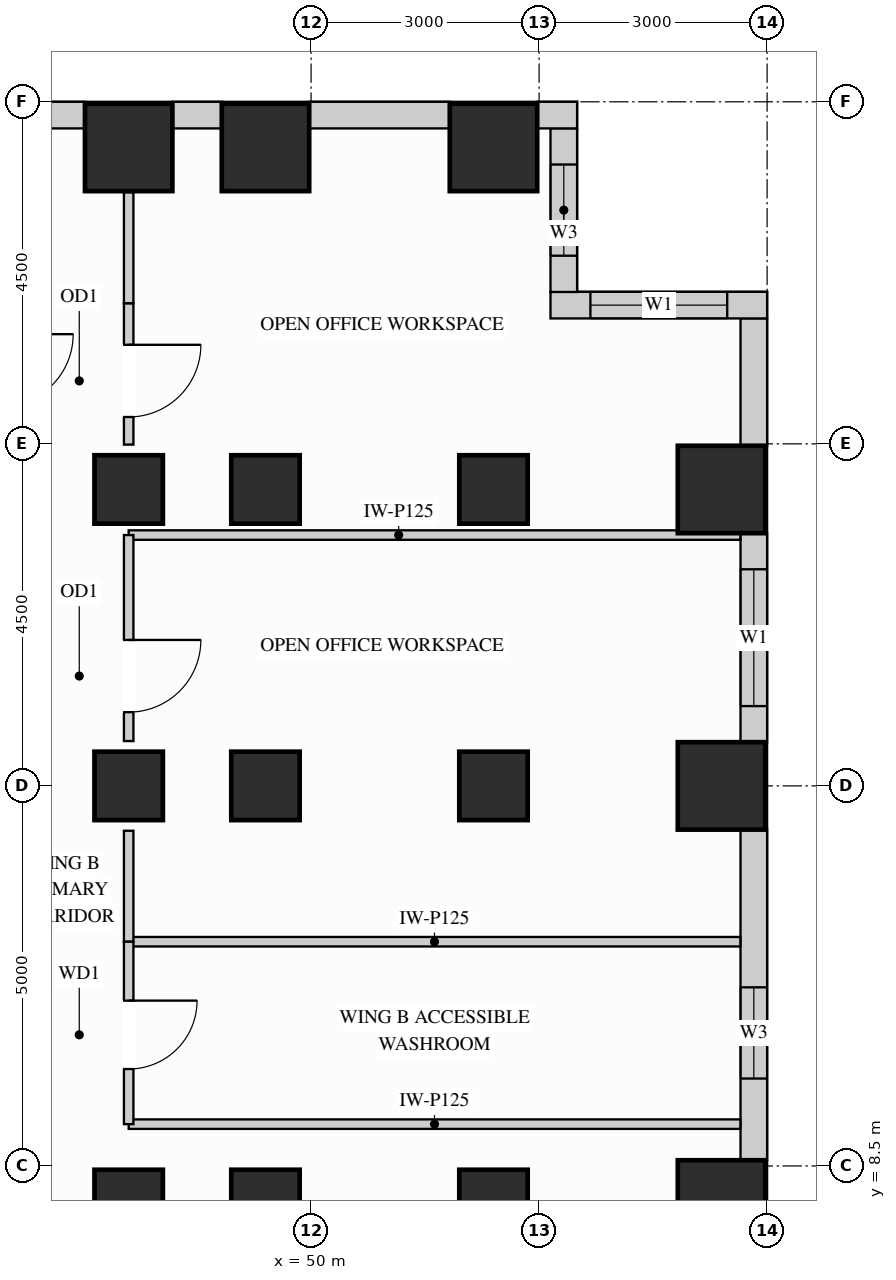
"""IFC4 building model, lengths in metres.
Left out: names, types, materials, properties, quantities, classifications, styles, units other than length and angle.
Written with IfcOpenShell. Run it as: python <this file> out.ifc"""

import sys

from ifc_helpers import new_model, si_unit, direction, frame, frame_2d, origin, origin_2d, place, context, subcontext, project, spatial, rectangle, extrude, source, transform, mapped, element, fill, save


model = new_model("IFC4")
c1 = context("Model", 3, precision=1e-05, world=origin(), true_north=direction((0.0, 1.0)))
c2 = subcontext(c1, "Body", "Model", "MODEL_VIEW")
j1 = project(units=[si_unit("LENGTHUNIT", "METRE"), si_unit("PLANEANGLEUNIT", "RADIAN")], contexts=[c1])
p1 = place(None, origin())
s1 = spatial("IfcSite", under=j1, at=p1, CompositionType="ELEMENT")
p2 = place(p1, origin())
s2 = spatial("IfcBuilding", under=s1, at=p2, CompositionType="ELEMENT")
p3 = place(p2, frame((0.0, 0.0, 106.2)))
s3 = spatial("IfcBuildingStorey", under=s2, at=p3, CompositionType="ELEMENT", Elevation=106.2)
m1 = source(origin(), c2, "Body", "SweptSolid", [
    extrude(rectangle(XDim=0.9, YDim=0.9, at=origin_2d()), origin(), (0.0, 0.0, 1.0), 3.38),
])
for number, where, z_axis, x_axis in (
    (1, (47.6, 13.5, 0.0), (0.0, 0.0, 1.0), (1.0, 0.0, 0.0)),
    (2, (47.6, 8.0, 0.0), (0.0, 0.0, 1.0), (1.0, 0.0, 0.0)),
    (3, (47.6, 17.4, 0.0), (0.0, 0.0, 1.0), (1.0, 0.0, 0.0)),
    (4, (49.4, 13.5, 0.0), (0.0, 0.0, 1.0), (1.0, 0.0, 0.0)),
    (5, (49.4, 17.4, 0.0), (0.0, 0.0, 1.0), (1.0, 0.0, 0.0)),
    (6, (49.4, 8.0, 0.0), (0.0, 0.0, 1.0), (1.0, 0.0, 0.0)),
    (7, (52.4, 13.5, 0.0), (0.0, 0.0, 1.0), (1.0, 0.0, 0.0)),
    (8, (52.4, 17.4, 0.0), (0.0, 0.0, 1.0), (1.0, 0.0, 0.0)),
    (9, (52.4, 8.0, 0.0), (0.0, 0.0, 1.0), (1.0, 0.0, 0.0)),
):
    element("IfcColumn", number, at=place(p3, frame(where, z_axis=z_axis, x_axis=x_axis)), inside=s3, PredefinedType="COLUMN", context=c2, shape_type="MappedRepresentation", body=[
        mapped(m1, transform((0.0, 0.0, 0.0), x_axis=(1.0, 0.0, 0.0), y_axis=(0.0, 1.0, 0.0), z_axis=(0.0, 0.0, 1.0))),
    ])
m2 = source(origin(), c2, "Body", "SweptSolid", [
    extrude(rectangle(XDim=1.15, YDim=1.15, at=origin_2d()), origin(), (0.0, 0.0, 1.0), 3.38),
])
for number, where, z_axis, x_axis in (
    (10, (47.6, 21.9, 0.0), (0.0, 0.0, 1.0), (1.0, 0.0, 0.0)),
    (11, (49.4, 21.9, 0.0), (0.0, 0.0, 1.0), (1.0, 0.0, 0.0)),
    (12, (52.4, 21.9, 0.0), (0.0, 0.0, 1.0), (1.0, 0.0, 0.0)),
    (13, (55.4, 13.5, 0.0), (0.0, 0.0, 1.0), (1.0, 0.0, 0.0)),
    (14, (55.4, 17.4, 0.0), (0.0, 0.0, 1.0), (1.0, 0.0, 0.0)),
    (15, (55.4, 8.0, 0.0), (0.0, 0.0, 1.0), (1.0, 0.0, 0.0)),
):
    element("IfcColumn", number, at=place(p3, frame(where, z_axis=z_axis, x_axis=x_axis)), inside=s3, PredefinedType="COLUMN", context=c2, shape_type="MappedRepresentation", body=[
        mapped(m2, transform((0.0, 0.0, 0.0), x_axis=(1.0, 0.0, 0.0), y_axis=(0.0, 1.0, 0.0), z_axis=(0.0, 0.0, 1.0))),
    ])
p4 = place(p3, frame((55.825, 8.573, 0.0), z_axis=(0.0, 0.0, 1.0), x_axis=(0.0, 1.0, 0.0)))
e16 = element("IfcWall", 16, at=p4, inside=s3, PredefinedType="SOLIDWALL", context=c2, shape_type="SweptSolid", body=[
    extrude(rectangle(XDim=4.354, YDim=0.35, at=frame_2d((2.177, 0.0))), origin(), (0.0, 0.0, 1.0), 3.365),
])
p5 = place(p4, frame((1.077, 0.0, 0.78)))
e17 = element("IfcOpeningElement", 17, at=p5, cuts=e16, PredefinedType="OPENING", context=c2, shape_type="SweptSolid", body=[
    extrude(rectangle(XDim=1.2, YDim=2.1, at=frame_2d((0.6, 1.05))), frame((0.0, 0.185, 0.0), z_axis=(0.0, -1.0, 0.0), x_axis=(1.0, 0.0, 0.0)), (0.0, 0.0, 1.0), 0.37),
])
p6 = place(p3, frame((55.825, 14.073, 0.0), z_axis=(0.0, 0.0, 1.0), x_axis=(0.0, 1.0, 0.0)))
e18 = element("IfcWall", 18, at=p6, inside=s3, PredefinedType="SOLIDWALL", context=c2, shape_type="SweptSolid", body=[
    extrude(rectangle(XDim=2.754, YDim=0.35, at=frame_2d((1.377, 0.0))), origin(), (0.0, 0.0, 1.0), 3.365),
])
p7 = place(p6, frame((0.477, 0.0, 0.78)))
e19 = element("IfcOpeningElement", 19, at=p7, cuts=e18, PredefinedType="OPENING", context=c2, shape_type="SweptSolid", body=[
    extrude(rectangle(XDim=1.8, YDim=2.1, at=frame_2d((0.9, 1.05))), frame((0.0, 0.185, 0.0), z_axis=(0.0, -1.0, 0.0), x_axis=(1.0, 0.0, 0.0)), (0.0, 0.0, 1.0), 0.37),
])
m3 = source(origin(), c2, "Body", "SweptSolid", [
    extrude(rectangle(XDim=1.679, YDim=0.35, at=frame_2d((0.84, 0.0))), origin(), (0.0, 0.0, 1.0), 3.365),
])
p8 = place(p3, frame((55.825, 17.973, 0.0), z_axis=(0.0, 0.0, 1.0), x_axis=(0.0, 1.0, 0.0)))
e20 = element("IfcWall", 20, at=p8, inside=s3, PredefinedType="SOLIDWALL", context=c2, shape_type="MappedRepresentation", body=[
    mapped(m3, transform((0.0, 0.0, 0.0), x_axis=(1.0, 0.0, 0.0), y_axis=(0.0, 1.0, 0.0), z_axis=(0.0, 0.0, 1.0))),
])
p9 = place(p3, frame((56.0, 19.825, 0.0), z_axis=(0.0, 0.0, 1.0), x_axis=(-1.0, 0.0, 0.0)))
e21 = element("IfcWall", 21, at=p9, inside=s3, PredefinedType="SOLIDWALL", context=c2, shape_type="SweptSolid", body=[
    extrude(rectangle(XDim=2.85, YDim=0.35, at=frame_2d((1.425, 0.0))), origin(), (0.0, 0.0, 1.0), 3.365),
])
p10 = place(p9, frame((0.525, 0.0, 0.78)))
e22 = element("IfcOpeningElement", 22, at=p10, cuts=e21, PredefinedType="OPENING", context=c2, shape_type="SweptSolid", body=[
    extrude(rectangle(XDim=1.8, YDim=2.1, at=frame_2d((0.9, 1.05))), frame((0.0, 0.185, 0.0), z_axis=(0.0, -1.0, 0.0), x_axis=(1.0, 0.0, 0.0)), (0.0, 0.0, 1.0), 0.37),
])
p11 = place(p3, frame((53.325, 19.998, 0.0), z_axis=(0.0, 0.0, 1.0), x_axis=(0.0, 1.0, 0.0)))
e23 = element("IfcWall", 23, at=p11, inside=s3, PredefinedType="SOLIDWALL", context=c2, shape_type="SweptSolid", body=[
    extrude(rectangle(XDim=2.154, YDim=0.35, at=frame_2d((1.077, 0.0))), origin(), (0.0, 0.0, 1.0), 3.365),
])
p12 = place(p11, frame((0.477, 0.0, 0.78)))
e24 = element("IfcOpeningElement", 24, at=p12, cuts=e23, PredefinedType="OPENING", context=c2, shape_type="SweptSolid", body=[
    extrude(rectangle(XDim=1.2, YDim=2.1, at=frame_2d((0.6, 1.05))), frame((0.0, 0.185, 0.0), z_axis=(0.0, -1.0, 0.0), x_axis=(1.0, 0.0, 0.0)), (0.0, 0.0, 1.0), 0.37),
])
m4 = source(origin(), c2, "Body", "SweptSolid", [
    extrude(rectangle(XDim=0.527, YDim=0.35, at=frame_2d((0.264, 0.0))), origin(), (0.0, 0.0, 1.0), 3.365),
])
p13 = place(p3, frame((53.5, 22.325, 0.0), z_axis=(0.0, 0.0, 1.0), x_axis=(-1.0, 0.0, 0.0)))
e25 = element("IfcWall", 25, at=p13, inside=s3, PredefinedType="SOLIDWALL", context=c2, shape_type="MappedRepresentation", body=[
    mapped(m4, transform((0.0, 0.0, 0.0), x_axis=(1.0, 0.0, 0.0), y_axis=(0.0, 1.0, 0.0), z_axis=(0.0, 0.0, 1.0))),
])
m5 = source(origin(), c2, "Body", "SweptSolid", [
    extrude(rectangle(XDim=1.854, YDim=0.35, at=frame_2d((0.927, 0.0))), origin(), (0.0, 0.0, 1.0), 3.365),
])
p14 = place(p3, frame((51.827, 22.325, 0.0), z_axis=(0.0, 0.0, 1.0), x_axis=(-1.0, 0.0, 0.0)))
e26 = element("IfcWall", 26, at=p14, inside=s3, PredefinedType="SOLIDWALL", context=c2, shape_type="MappedRepresentation", body=[
    mapped(m5, transform((0.0, 0.0, 0.0), x_axis=(1.0, 0.0, 0.0), y_axis=(0.0, 1.0, 0.0), z_axis=(0.0, 0.0, 1.0))),
])
m6 = source(origin(), c2, "Body", "SweptSolid", [
    extrude(rectangle(XDim=0.654, YDim=0.35, at=frame_2d((0.327, 0.0))), origin(), (0.0, 0.0, 1.0), 3.365),
])
p15 = place(p3, frame((48.827, 22.325, 0.0), z_axis=(0.0, 0.0, 1.0), x_axis=(-1.0, 0.0, 0.0)))
e27 = element("IfcWall", 27, at=p15, inside=s3, PredefinedType="SOLIDWALL", context=c2, shape_type="MappedRepresentation", body=[
    mapped(m6, transform((0.0, 0.0, 0.0), x_axis=(1.0, 0.0, 0.0), y_axis=(0.0, 1.0, 0.0), z_axis=(0.0, 0.0, 1.0))),
])
p16 = place(p3, frame((47.027, 22.325, 0.0), z_axis=(0.0, 0.0, 1.0), x_axis=(-1.0, 0.0, 0.0)))
e28 = element("IfcWall", 28, at=p16, inside=s3, PredefinedType="SOLIDWALL", context=c2, shape_type="SweptSolid", body=[
    extrude(rectangle(XDim=6.454, YDim=0.35, at=frame_2d((3.227, 0.0))), origin(), (0.0, 0.0, 1.0), 3.365),
])
p17 = place(p16, frame((1.749, 0.0, 0.78)))
e29 = element("IfcOpeningElement", 29, at=p17, cuts=e28, PredefinedType="OPENING", context=c2, shape_type="SweptSolid", body=[
    extrude(rectangle(XDim=1.8, YDim=2.1, at=frame_2d((0.9, 1.05))), frame((0.0, 0.185, 0.0), z_axis=(0.0, -1.0, 0.0), x_axis=(1.0, 0.0, 0.0)), (0.0, 0.0, 1.0), 0.37),
])
p18 = place(p16, frame((3.942, 0.0, 0.78)))
e30 = element("IfcOpeningElement", 30, at=p18, cuts=e28, PredefinedType="OPENING", context=c2, shape_type="SweptSolid", body=[
    extrude(rectangle(XDim=1.8, YDim=2.1, at=frame_2d((0.9, 1.05))), frame((0.0, 0.185, 0.0), z_axis=(0.0, -1.0, 0.0), x_axis=(1.0, 0.0, 0.0)), (0.0, 0.0, 1.0), 0.37),
])
m7 = source(origin(), c2, "Body", "SweptSolid", [
    extrude(rectangle(XDim=8.048, YDim=0.125, at=frame_2d((4.024, 0.0))), origin(), (0.0, 0.0, 1.0), 3.365),
])
for number, where, z_axis, x_axis in (
    (31, (47.6, 11.45, 0.0), (0.0, 0.0, 1.0), (1.0, 0.0, 0.0)),
    (32, (47.6, 16.8, 0.0), (0.0, 0.0, 1.0), (1.0, 0.0, 0.0)),
    (33, (47.6, 9.05, 0.0), (0.0, 0.0, 1.0), (1.0, 0.0, 0.0)),
):
    element("IfcWall", number, at=place(p3, frame(where, z_axis=z_axis, x_axis=x_axis)), inside=s3, PredefinedType="PARTITIONING", context=c2, shape_type="MappedRepresentation", body=[
        mapped(m7, transform((0.0, 0.0, 0.0), x_axis=(1.0, 0.0, 0.0), y_axis=(0.0, 1.0, 0.0), z_axis=(0.0, 0.0, 1.0))),
    ])
m8 = source(origin(), c2, "Body", "SweptSolid", [
    extrude(rectangle(XDim=1.46, YDim=0.125, at=frame_2d((0.73, 0.0))), origin(), (0.0, 0.0, 1.0), 2.677),
])
p19 = place(p3, frame((47.6, 11.45, 0.0), z_axis=(0.0, 0.0, 1.0), x_axis=(0.0, 1.0, 0.0)))
e34 = element("IfcWall", 34, at=p19, inside=s3, PredefinedType="PARTITIONING", context=c2, shape_type="MappedRepresentation", body=[
    mapped(m8, transform((0.0, 0.0, 0.0), x_axis=(1.0, 0.0, 0.0), y_axis=(0.0, 1.0, 0.0), z_axis=(0.0, 0.0, 1.0))),
])
p20 = place(p3, frame((47.6, 14.09, 0.0), z_axis=(0.0, 0.0, 1.0), x_axis=(0.0, 1.0, 0.0)))
e35 = element("IfcWall", 35, at=p20, inside=s3, PredefinedType="PARTITIONING", context=c2, shape_type="SweptSolid", body=[
    extrude(rectangle(XDim=2.71, YDim=0.125, at=frame_2d((1.355, 0.0))), origin(), (0.0, 0.0, 1.0), 2.677),
])
p21 = place(p20, frame((0.38, 0.0, 0.0)))
e36 = element("IfcOpeningElement", 36, at=p21, cuts=e35, PredefinedType="OPENING", context=c2, shape_type="SweptSolid", body=[
    extrude(rectangle(XDim=0.95, YDim=2.15, at=frame_2d((0.475, 1.075))), frame((0.0, 0.073, 0.0), z_axis=(0.0, -1.0, 0.0), x_axis=(1.0, 0.0, 0.0)), (0.0, 0.0, 1.0), 0.145),
])
p22 = place(p3, frame((47.6, 17.99, 0.0), z_axis=(0.0, 0.0, 1.0), x_axis=(0.0, 1.0, 0.0)))
e37 = element("IfcWall", 37, at=p22, inside=s3, PredefinedType="PARTITIONING", context=c2, shape_type="SweptSolid", body=[
    extrude(rectangle(XDim=1.86, YDim=0.125, at=frame_2d((0.93, 0.0))), origin(), (0.0, 0.0, 1.0), 2.677),
])
p23 = place(p22, frame((0.363, 0.0, 0.0)))
e38 = element("IfcOpeningElement", 38, at=p23, cuts=e37, PredefinedType="OPENING", context=c2, shape_type="SweptSolid", body=[
    extrude(rectangle(XDim=0.95, YDim=2.15, at=frame_2d((0.475, 1.075))), frame((0.0, 0.073, 0.0), z_axis=(0.0, -1.0, 0.0), x_axis=(1.0, 0.0, 0.0)), (0.0, 0.0, 1.0), 0.145),
])
p24 = place(p3, frame((47.6, 19.85, 0.0), z_axis=(0.0, 0.0, 1.0), x_axis=(0.0, 1.0, 0.0)))
e39 = element("IfcWall", 39, at=p24, inside=s3, PredefinedType="PARTITIONING", context=c2, shape_type="MappedRepresentation", body=[
    mapped(m8, transform((0.0, 0.0, 0.0), x_axis=(1.0, 0.0, 0.0), y_axis=(0.0, 1.0, 0.0), z_axis=(0.0, 0.0, 1.0))),
])
p25 = place(p3, frame((47.6, 9.05, 0.0), z_axis=(0.0, 0.0, 1.0), x_axis=(0.0, 1.0, 0.0)))
e40 = element("IfcWall", 40, at=p25, inside=s3, PredefinedType="PARTITIONING", context=c2, shape_type="SweptSolid", body=[
    extrude(rectangle(XDim=2.4, YDim=0.125, at=frame_2d((1.2, 0.0))), origin(), (0.0, 0.0, 1.0), 2.677),
])
p26 = place(p25, frame((0.725, 0.0, 0.0)))
e41 = element("IfcOpeningElement", 41, at=p26, cuts=e40, PredefinedType="OPENING", context=c2, shape_type="SweptSolid", body=[
    extrude(rectangle(XDim=0.9, YDim=2.15, at=frame_2d((0.45, 1.075))), frame((0.0, 0.073, 0.0), z_axis=(0.0, -1.0, 0.0), x_axis=(1.0, 0.0, 0.0)), (0.0, 0.0, 1.0), 0.145),
])
m9 = source(origin(), c2, "Body", "SweptSolid", [
    extrude(rectangle(XDim=0.95, YDim=2.15, at=frame_2d((0.475, 1.075))), frame((0.0, 0.025, 0.0), z_axis=(0.0, -1.0, 0.0), x_axis=(1.0, 0.0, 0.0)), (0.0, 0.0, 1.0), 0.05),
])
p27 = place(p21, origin())
e42 = element("IfcDoor", 42, at=p27, inside=s3, OperationType="SINGLE_SWING_RIGHT", PredefinedType="DOOR", context=c2, shape_type="MappedRepresentation", body=[
    mapped(m9, transform((0.0, 0.0, 0.0), x_axis=(1.0, 0.0, 0.0), y_axis=(0.0, 1.0, 0.0), z_axis=(0.0, 0.0, 1.0))),
])
fill(e36, e42)
p28 = place(p23, origin())
e43 = element("IfcDoor", 43, at=p28, inside=s3, OperationType="SINGLE_SWING_RIGHT", PredefinedType="DOOR", context=c2, shape_type="MappedRepresentation", body=[
    mapped(m9, transform((0.0, 0.0, 0.0), x_axis=(1.0, 0.0, 0.0), y_axis=(0.0, 1.0, 0.0), z_axis=(0.0, 0.0, 1.0))),
])
fill(e38, e43)
m10 = source(origin(), c2, "Body", "SweptSolid", [
    extrude(rectangle(XDim=0.9, YDim=2.15, at=frame_2d((0.45, 1.075))), frame((0.0, 0.025, 0.0), z_axis=(0.0, -1.0, 0.0), x_axis=(1.0, 0.0, 0.0)), (0.0, 0.0, 1.0), 0.05),
])
p29 = place(p26, origin())
e44 = element("IfcDoor", 44, at=p29, inside=s3, OperationType="SINGLE_SWING_RIGHT", PredefinedType="DOOR", context=c2, shape_type="MappedRepresentation", body=[
    mapped(m10, transform((0.0, 0.0, 0.0), x_axis=(1.0, 0.0, 0.0), y_axis=(0.0, 1.0, 0.0), z_axis=(0.0, 0.0, 1.0))),
])
fill(e41, e44)
m11 = source(origin(), c2, "Body", "SweptSolid", [
    extrude(rectangle(XDim=1.8, YDim=2.1, at=frame_2d((0.9, 1.05))), frame((0.0, 0.03, 0.0), z_axis=(0.0, -1.0, 0.0), x_axis=(1.0, 0.0, 0.0)), (0.0, 0.0, 1.0), 0.06),
])
p30 = place(p7, origin())
e45 = element("IfcWindow", 45, at=p30, inside=s3, PartitioningType="SINGLE_PANEL", PredefinedType="WINDOW", context=c2, shape_type="MappedRepresentation", body=[
    mapped(m11, transform((0.0, 0.0, 0.0), x_axis=(1.0, 0.0, 0.0), y_axis=(0.0, 1.0, 0.0), z_axis=(0.0, 0.0, 1.0))),
])
fill(e19, e45)
p31 = place(p10, origin())
e46 = element("IfcWindow", 46, at=p31, inside=s3, PartitioningType="SINGLE_PANEL", PredefinedType="WINDOW", context=c2, shape_type="MappedRepresentation", body=[
    mapped(m11, transform((0.0, 0.0, 0.0), x_axis=(1.0, 0.0, 0.0), y_axis=(0.0, 1.0, 0.0), z_axis=(0.0, 0.0, 1.0))),
])
fill(e22, e46)
m12 = source(origin(), c2, "Body", "SweptSolid", [
    extrude(rectangle(XDim=1.2, YDim=2.1, at=frame_2d((0.6, 1.05))), frame((0.0, 0.03, 0.0), z_axis=(0.0, -1.0, 0.0), x_axis=(1.0, 0.0, 0.0)), (0.0, 0.0, 1.0), 0.06),
])
p32 = place(p5, origin())
e47 = element("IfcWindow", 47, at=p32, inside=s3, PartitioningType="SINGLE_PANEL", PredefinedType="WINDOW", context=c2, shape_type="MappedRepresentation", body=[
    mapped(m12, transform((0.0, 0.0, 0.0), x_axis=(1.0, 0.0, 0.0), y_axis=(0.0, 1.0, 0.0), z_axis=(0.0, 0.0, 1.0))),
])
fill(e17, e47)
p33 = place(p12, origin())
e48 = element("IfcWindow", 48, at=p33, inside=s3, PartitioningType="SINGLE_PANEL", PredefinedType="WINDOW", context=c2, shape_type="MappedRepresentation", body=[
    mapped(m12, transform((0.0, 0.0, 0.0), x_axis=(1.0, 0.0, 0.0), y_axis=(0.0, 1.0, 0.0), z_axis=(0.0, 0.0, 1.0))),
])
fill(e24, e48)
save(model, sys.argv[1])
